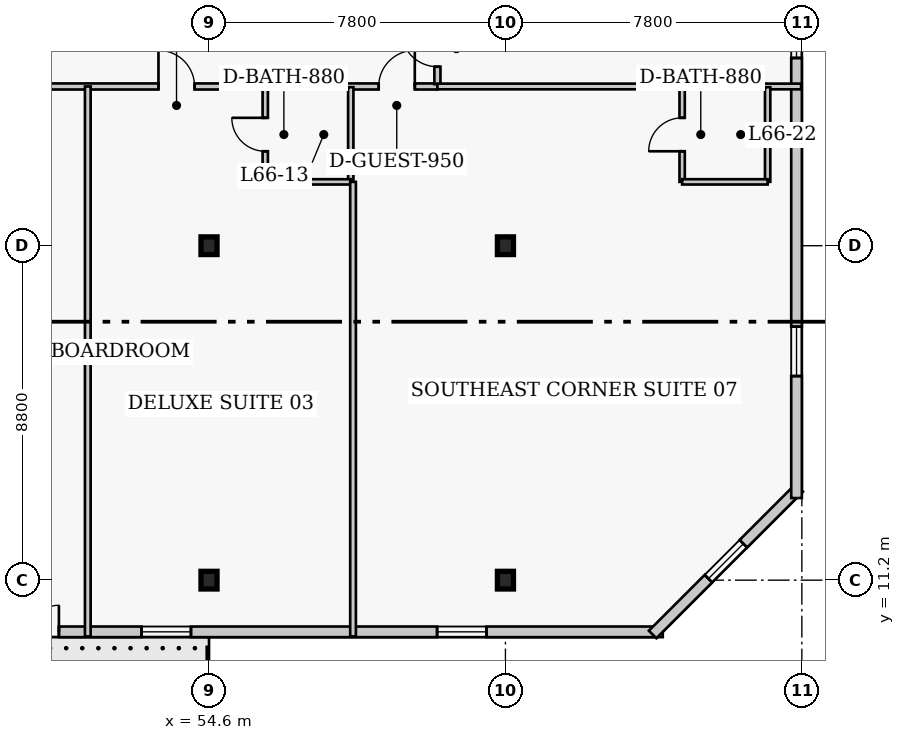
"""IFC4 building model, lengths in metres.
Left out: names, types, materials, properties, quantities, classifications, styles, units other than length and angle.
Written with IfcOpenShell. Run it as: python <this file> out.ifc"""

import sys

from ifc_helpers import new_model, si_unit, direction, frame, frame_2d, origin, origin_2d, place, context, subcontext, project, spatial, rectangle, i_section, extrude, element, fill, save


model = new_model("IFC4")
c1 = context("Model", 3, precision=1e-05, world=origin(), true_north=direction((0.0, 1.0)))
c2 = subcontext(c1, "Body", "Model", "MODEL_VIEW")
j1 = project(units=[si_unit("LENGTHUNIT", "METRE"), si_unit("PLANEANGLEUNIT", "RADIAN")], contexts=[c1])
p1 = place(None, origin())
s1 = spatial("IfcSite", under=j1, at=p1, CompositionType="ELEMENT")
p2 = place(p1, origin())
s2 = spatial("IfcBuilding", under=s1, at=p2, CompositionType="ELEMENT")
p3 = place(p2, frame((0.0, 0.0, 265.4)))
s3 = spatial("IfcBuildingStorey", under=s2, at=p3, CompositionType="ELEMENT", Elevation=265.4)
for number, where, z_axis, x_axis in (
    (1, (54.6, 11.2, 0.0), (0.0, 0.0, 1.0), (1.0, 0.0, 0.0)),
    (2, (54.6, 20.0, 0.0), (0.0, 0.0, 1.0), (1.0, 0.0, 0.0)),
    (3, (62.4, 11.2, 0.0), (0.0, 0.0, 1.0), (1.0, 0.0, 0.0)),
    (4, (62.4, 20.0, 0.0), (0.0, 0.0, 1.0), (1.0, 0.0, 0.0)),
):
    element("IfcColumn", number, at=place(p3, frame(where, z_axis=z_axis, x_axis=x_axis)), inside=s3, PredefinedType="COLUMN", context=c2, shape_type="SweptSolid", body=[
        extrude(i_section(OverallWidth=0.422, OverallDepth=0.465, WebThickness=0.045, FlangeThickness=0.073, FilletRadius=0.017, at=origin_2d()), origin(), (0.0, 0.0, 1.0), 4.0),
    ])
p4 = place(p3, frame((41.71, 9.84, 0.0), z_axis=(0.0, 0.0, 1.0), x_axis=(1.0, 0.0, 0.0)))
e5 = element("IfcWall", 5, at=p4, inside=s3, PredefinedType="SOLIDWALL", context=c2, shape_type="SweptSolid", body=[
    extrude(rectangle(XDim=24.83, YDim=0.28, at=frame_2d((12.415, 0.0))), origin(), (0.0, 0.0, 1.0), 3.76),
])
p5 = place(p4, frame((7.54, 0.0, 0.0)))
e6 = element("IfcOpeningElement", 6, at=p5, cuts=e5, PredefinedType="OPENING", context=c2, shape_type="SweptSolid", body=[
    extrude(rectangle(XDim=1.4, YDim=2.15, at=frame_2d((0.7, 1.075))), frame((0.0, 0.15, 0.0), z_axis=(0.0, -1.0, 0.0), x_axis=(1.0, 0.0, 0.0)), (0.0, 0.0, 1.0), 0.3),
])
p6 = place(p4, frame((2.838, 0.0, 0.85)))
e7 = element("IfcOpeningElement", 7, at=p6, cuts=e5, PredefinedType="OPENING", context=c2, shape_type="SweptSolid", body=[
    extrude(rectangle(XDim=1.3, YDim=1.7, at=frame_2d((0.65, 0.85))), frame((0.0, 0.15, 0.0), z_axis=(0.0, -1.0, 0.0), x_axis=(1.0, 0.0, 0.0)), (0.0, 0.0, 1.0), 0.3),
])
p7 = place(p4, frame((11.115, 0.0, 0.85)))
e8 = element("IfcOpeningElement", 8, at=p7, cuts=e5, PredefinedType="OPENING", context=c2, shape_type="SweptSolid", body=[
    extrude(rectangle(XDim=1.3, YDim=1.7, at=frame_2d((0.65, 0.85))), frame((0.0, 0.15, 0.0), z_axis=(0.0, -1.0, 0.0), x_axis=(1.0, 0.0, 0.0)), (0.0, 0.0, 1.0), 0.3),
])
p8 = place(p4, frame((18.892, 0.0, 0.85)))
e9 = element("IfcOpeningElement", 9, at=p8, cuts=e5, PredefinedType="OPENING", context=c2, shape_type="SweptSolid", body=[
    extrude(rectangle(XDim=1.3, YDim=1.7, at=frame_2d((0.65, 0.85))), frame((0.0, 0.15, 0.0), z_axis=(0.0, -1.0, 0.0), x_axis=(1.0, 0.0, 0.0)), (0.0, 0.0, 1.0), 0.3),
])
p9 = place(p3, frame((66.273, 9.771, 0.0), z_axis=(0.0, 0.0, 1.0), x_axis=(0.707129162587, 0.707084399077, 0.0)))
e10 = element("IfcWall", 10, at=p9, inside=s3, PredefinedType="SOLIDWALL", context=c2, shape_type="SweptSolid", body=[
    extrude(rectangle(XDim=5.454, YDim=0.28, at=frame_2d((2.727, 0.0))), origin(), (0.0, 0.0, 1.0), 3.76),
])
p10 = place(p9, frame((2.077, 0.0, 0.85)))
e11 = element("IfcOpeningElement", 11, at=p10, cuts=e10, PredefinedType="OPENING", context=c2, shape_type="SweptSolid", body=[
    extrude(rectangle(XDim=1.3, YDim=1.7, at=frame_2d((0.65, 0.85))), frame((0.0, 0.15, 0.0), z_axis=(0.0, -1.0, 0.0), x_axis=(1.0, 0.0, 0.0)), (0.0, 0.0, 1.0), 0.3),
])
p11 = place(p3, frame((70.06, 13.36, 0.0), z_axis=(0.0, 0.0, 1.0), x_axis=(0.0, 1.0, 0.0)))
e12 = element("IfcWall", 12, at=p11, inside=s3, PredefinedType="SOLIDWALL", context=c2, shape_type="SweptSolid", body=[
    extrude(rectangle(XDim=30.88, YDim=0.28, at=frame_2d((15.44, 0.0))), origin(), (0.0, 0.0, 1.0), 3.76),
])
p12 = place(p11, frame((3.21, 0.0, 0.85)))
e13 = element("IfcOpeningElement", 13, at=p12, cuts=e12, PredefinedType="OPENING", context=c2, shape_type="SweptSolid", body=[
    extrude(rectangle(XDim=1.3, YDim=1.7, at=frame_2d((0.65, 0.85))), frame((0.0, 0.15, 0.0), z_axis=(0.0, -1.0, 0.0), x_axis=(1.0, 0.0, 0.0)), (0.0, 0.0, 1.0), 0.3),
])
p13 = place(p11, frame((11.58, 0.0, 0.85)))
e14 = element("IfcOpeningElement", 14, at=p13, cuts=e12, PredefinedType="OPENING", context=c2, shape_type="SweptSolid", body=[
    extrude(rectangle(XDim=1.3, YDim=1.7, at=frame_2d((0.65, 0.85))), frame((0.0, 0.15, 0.0), z_axis=(0.0, -1.0, 0.0), x_axis=(1.0, 0.0, 0.0)), (0.0, 0.0, 1.0), 0.3),
])
p14 = place(p11, frame((18.65, 0.0, 0.85)))
e15 = element("IfcOpeningElement", 15, at=p14, cuts=e12, PredefinedType="OPENING", context=c2, shape_type="SweptSolid", body=[
    extrude(rectangle(XDim=1.3, YDim=1.7, at=frame_2d((0.65, 0.85))), frame((0.0, 0.15, 0.0), z_axis=(0.0, -1.0, 0.0), x_axis=(1.0, 0.0, 0.0)), (0.0, 0.0, 1.0), 0.3),
])
p15 = place(p11, frame((26.37, 0.0, 0.85)))
e16 = element("IfcOpeningElement", 16, at=p15, cuts=e12, PredefinedType="OPENING", context=c2, shape_type="SweptSolid", body=[
    extrude(rectangle(XDim=1.3, YDim=1.7, at=frame_2d((0.65, 0.85))), frame((0.0, 0.15, 0.0), z_axis=(0.0, -1.0, 0.0), x_axis=(1.0, 0.0, 0.0)), (0.0, 0.0, 1.0), 0.3),
])
p16 = place(p3, frame((35.8, 24.19, 0.0), z_axis=(0.0, 0.0, 1.0), x_axis=(1.0, 0.0, 0.0)))
e17 = element("IfcWall", 17, at=p16, inside=s3, PredefinedType="PARTITIONING", context=c2, shape_type="SweptSolid", body=[
    extrude(rectangle(XDim=24.81, YDim=0.16, at=frame_2d((12.405, 0.0))), origin(), (0.0, 0.0, 1.0), 3.76),
])
p17 = place(p16, frame((2.115, 0.0, 0.0)))
e18 = element("IfcOpeningElement", 18, at=p17, cuts=e17, PredefinedType="OPENING", context=c2, shape_type="SweptSolid", body=[
    extrude(rectangle(XDim=0.95, YDim=2.1, at=frame_2d((0.475, 1.05))), frame((0.0, 0.09, 0.0), z_axis=(0.0, -1.0, 0.0), x_axis=(1.0, 0.0, 0.0)), (0.0, 0.0, 1.0), 0.18),
])
p18 = place(p16, frame((11.345, 0.0, 0.0)))
e19 = element("IfcOpeningElement", 19, at=p18, cuts=e17, PredefinedType="OPENING", context=c2, shape_type="SweptSolid", body=[
    extrude(rectangle(XDim=1.0, YDim=2.15, at=frame_2d((0.5, 1.075))), frame((0.0, 0.09, 0.0), z_axis=(0.0, -1.0, 0.0), x_axis=(1.0, 0.0, 0.0)), (0.0, 0.0, 1.0), 0.18),
])
p19 = place(p16, frame((17.47, 0.0, 0.0)))
e20 = element("IfcOpeningElement", 20, at=p19, cuts=e17, PredefinedType="OPENING", context=c2, shape_type="SweptSolid", body=[
    extrude(rectangle(XDim=0.95, YDim=2.1, at=frame_2d((0.475, 1.05))), frame((0.0, 0.09, 0.0), z_axis=(0.0, -1.0, 0.0), x_axis=(1.0, 0.0, 0.0)), (0.0, 0.0, 1.0), 0.18),
])
p20 = place(p16, frame((23.265, 0.0, 0.0)))
e21 = element("IfcOpeningElement", 21, at=p20, cuts=e17, PredefinedType="OPENING", context=c2, shape_type="SweptSolid", body=[
    extrude(rectangle(XDim=0.95, YDim=2.1, at=frame_2d((0.475, 1.05))), frame((0.0, 0.09, 0.0), z_axis=(0.0, -1.0, 0.0), x_axis=(1.0, 0.0, 0.0)), (0.0, 0.0, 1.0), 0.18),
])
p21 = place(p3, frame((60.61, 24.25, 0.0), z_axis=(0.0, 0.0, 1.0), x_axis=(0.0, 1.0, 0.0)))
e22 = element("IfcWall", 22, at=p21, inside=s3, PredefinedType="PARTITIONING", context=c2, shape_type="SweptSolid", body=[
    extrude(rectangle(XDim=16.4, YDim=0.16, at=frame_2d((8.2, 0.0))), origin(), (0.0, 0.0, 1.0), 3.76),
])
p22 = place(p21, frame((0.46, 0.0, 0.0)))
e23 = element("IfcOpeningElement", 23, at=p22, cuts=e22, PredefinedType="OPENING", context=c2, shape_type="SweptSolid", body=[
    extrude(rectangle(XDim=0.95, YDim=2.1, at=frame_2d((0.475, 1.05))), frame((0.0, 0.09, 0.0), z_axis=(0.0, -1.0, 0.0), x_axis=(1.0, 0.0, 0.0)), (0.0, 0.0, 1.0), 0.18),
])
p23 = place(p21, frame((11.9, 0.0, 0.0)))
e24 = element("IfcOpeningElement", 24, at=p23, cuts=e22, PredefinedType="OPENING", context=c2, shape_type="SweptSolid", body=[
    extrude(rectangle(XDim=1.0, YDim=2.15, at=frame_2d((0.5, 1.075))), frame((0.0, 0.09, 0.0), z_axis=(0.0, -1.0, 0.0), x_axis=(1.0, 0.0, 0.0)), (0.0, 0.0, 1.0), 0.18),
])
p24 = place(p3, frame((51.41, 9.72, 0.0), z_axis=(0.0, 0.0, 1.0), x_axis=(0.0, 1.0, 0.0)))
e25 = element("IfcWall", 25, at=p24, inside=s3, PredefinedType="PARTITIONING", context=c2, shape_type="SweptSolid", body=[
    extrude(rectangle(XDim=14.47, YDim=0.15, at=frame_2d((7.235, 0.0))), origin(), (0.0, 0.0, 1.0), 3.76),
])
p25 = place(p3, frame((56.08, 21.68, 0.0), z_axis=(0.0, 0.0, 1.0), x_axis=(0.0, 1.0, 0.0)))
e26 = element("IfcWall", 26, at=p25, inside=s3, PredefinedType="PLUMBINGWALL", context=c2, shape_type="SweptSolid", body=[
    extrude(rectangle(XDim=2.49, YDim=0.14, at=frame_2d((1.245, 0.0))), origin(), (0.0, 0.0, 1.0), 3.76),
])
p26 = place(p25, frame((0.805, 0.0, 0.0)))
e27 = element("IfcOpeningElement", 27, at=p26, cuts=e26, PredefinedType="OPENING", context=c2, shape_type="SweptSolid", body=[
    extrude(rectangle(XDim=0.88, YDim=2.05, at=frame_2d((0.44, 1.025))), frame((0.0, 0.08, 0.0), z_axis=(0.0, -1.0, 0.0), x_axis=(1.0, 0.0, 0.0)), (0.0, 0.0, 1.0), 0.16),
])
p27 = place(p3, frame((58.33, 21.68, 0.0), z_axis=(0.0, 0.0, 1.0), x_axis=(0.0, 1.0, 0.0)))
e28 = element("IfcWall", 28, at=p27, inside=s3, PredefinedType="PLUMBINGWALL", context=c2, shape_type="SweptSolid", body=[
    extrude(rectangle(XDim=2.49, YDim=0.14, at=frame_2d((1.245, 0.0))), origin(), (0.0, 0.0, 1.0), 3.76),
])
p28 = place(p3, frame((56.08, 21.68, 0.0), z_axis=(0.0, 0.0, 1.0), x_axis=(1.0, 0.0, 0.0)))
e29 = element("IfcWall", 29, at=p28, inside=s3, PredefinedType="PLUMBINGWALL", context=c2, shape_type="SweptSolid", body=[
    extrude(rectangle(XDim=2.25, YDim=0.14, at=frame_2d((1.125, 0.0))), origin(), (0.0, 0.0, 1.0), 3.76),
])
p29 = place(p3, frame((58.39, 9.72, 0.0), z_axis=(0.0, 0.0, 1.0), x_axis=(0.0, 1.0, 0.0)))
e30 = element("IfcWall", 30, at=p29, inside=s3, PredefinedType="PARTITIONING", context=c2, shape_type="SweptSolid", body=[
    extrude(rectangle(XDim=11.96, YDim=0.15, at=frame_2d((5.98, 0.0))), origin(), (0.0, 0.0, 1.0), 3.356),
])
p30 = place(p3, frame((60.61, 24.19, 0.0), z_axis=(0.0, 0.0, 1.0), x_axis=(1.0, 0.0, 0.0)))
e31 = element("IfcWall", 31, at=p30, inside=s3, PredefinedType="PARTITIONING", context=c2, shape_type="SweptSolid", body=[
    extrude(rectangle(XDim=9.57, YDim=0.15, at=frame_2d((4.785, 0.0))), origin(), (0.0, 0.0, 1.0), 3.76),
])
p31 = place(p3, frame((67.05, 21.68, 0.0), z_axis=(0.0, 0.0, 1.0), x_axis=(0.0, 1.0, 0.0)))
e32 = element("IfcWall", 32, at=p31, inside=s3, PredefinedType="PLUMBINGWALL", context=c2, shape_type="SweptSolid", body=[
    extrude(rectangle(XDim=2.49, YDim=0.14, at=frame_2d((1.245, 0.0))), origin(), (0.0, 0.0, 1.0), 3.76),
])
p32 = place(p31, frame((0.805, 0.0, 0.0)))
e33 = element("IfcOpeningElement", 33, at=p32, cuts=e32, PredefinedType="OPENING", context=c2, shape_type="SweptSolid", body=[
    extrude(rectangle(XDim=0.88, YDim=2.05, at=frame_2d((0.44, 1.025))), frame((0.0, 0.08, 0.0), z_axis=(0.0, -1.0, 0.0), x_axis=(1.0, 0.0, 0.0)), (0.0, 0.0, 1.0), 0.16),
])
p33 = place(p3, frame((69.3, 21.68, 0.0), z_axis=(0.0, 0.0, 1.0), x_axis=(0.0, 1.0, 0.0)))
e34 = element("IfcWall", 34, at=p33, inside=s3, PredefinedType="PLUMBINGWALL", context=c2, shape_type="SweptSolid", body=[
    extrude(rectangle(XDim=2.49, YDim=0.14, at=frame_2d((1.245, 0.0))), origin(), (0.0, 0.0, 1.0), 3.76),
])
p34 = place(p3, frame((67.05, 21.68, 0.0), z_axis=(0.0, 0.0, 1.0), x_axis=(1.0, 0.0, 0.0)))
e35 = element("IfcWall", 35, at=p34, inside=s3, PredefinedType="PLUMBINGWALL", context=c2, shape_type="SweptSolid", body=[
    extrude(rectangle(XDim=2.25, YDim=0.14, at=frame_2d((1.125, 0.0))), origin(), (0.0, 0.0, 1.0), 3.76),
])
p35 = place(p5, origin())
e36 = element("IfcDoor", 36, at=p35, inside=s3, OperationType="DOUBLE_DOOR_SINGLE_SWING", PredefinedType="DOOR", context=c2, shape_type="SweptSolid", body=[
    extrude(rectangle(XDim=1.4, YDim=2.15, at=frame_2d((0.7, 1.075))), frame((0.0, 0.025, 0.0), z_axis=(0.0, -1.0, 0.0), x_axis=(1.0, 0.0, 0.0)), (0.0, 0.0, 1.0), 0.05),
])
fill(e6, e36)
p36 = place(p7, origin())
e37 = element("IfcWindow", 37, at=p36, inside=s3, PartitioningType="SINGLE_PANEL", PredefinedType="WINDOW", context=c2, shape_type="SweptSolid", body=[
    extrude(rectangle(XDim=1.3, YDim=1.7, at=frame_2d((0.65, 0.85))), frame((0.0, 0.03, 0.0), z_axis=(0.0, -1.0, 0.0), x_axis=(1.0, 0.0, 0.0)), (0.0, 0.0, 1.0), 0.06),
])
fill(e8, e37)
p37 = place(p8, origin())
e38 = element("IfcWindow", 38, at=p37, inside=s3, PartitioningType="SINGLE_PANEL", PredefinedType="WINDOW", context=c2, shape_type="SweptSolid", body=[
    extrude(rectangle(XDim=1.3, YDim=1.7, at=frame_2d((0.65, 0.85))), frame((0.0, 0.03, 0.0), z_axis=(0.0, -1.0, 0.0), x_axis=(1.0, 0.0, 0.0)), (0.0, 0.0, 1.0), 0.06),
])
fill(e9, e38)
p38 = place(p10, origin())
e39 = element("IfcWindow", 39, at=p38, inside=s3, PartitioningType="SINGLE_PANEL", PredefinedType="WINDOW", context=c2, shape_type="SweptSolid", body=[
    extrude(rectangle(XDim=1.3, YDim=1.7, at=frame_2d((0.65, 0.85))), frame((0.0, 0.03, 0.0), z_axis=(0.0, -1.0, 0.0), x_axis=(1.0, 0.0, 0.0)), (0.0, 0.0, 1.0), 0.06),
])
fill(e11, e39)
p39 = place(p12, origin())
e40 = element("IfcWindow", 40, at=p39, inside=s3, PartitioningType="SINGLE_PANEL", PredefinedType="WINDOW", context=c2, shape_type="SweptSolid", body=[
    extrude(rectangle(XDim=1.3, YDim=1.7, at=frame_2d((0.65, 0.85))), frame((0.0, 0.03, 0.0), z_axis=(0.0, -1.0, 0.0), x_axis=(1.0, 0.0, 0.0)), (0.0, 0.0, 1.0), 0.06),
])
fill(e13, e40)
p40 = place(p13, origin())
e41 = element("IfcWindow", 41, at=p40, inside=s3, PartitioningType="SINGLE_PANEL", PredefinedType="WINDOW", context=c2, shape_type="SweptSolid", body=[
    extrude(rectangle(XDim=1.3, YDim=1.7, at=frame_2d((0.65, 0.85))), frame((0.0, 0.03, 0.0), z_axis=(0.0, -1.0, 0.0), x_axis=(1.0, 0.0, 0.0)), (0.0, 0.0, 1.0), 0.06),
])
fill(e14, e41)
p41 = place(p26, origin())
e42 = element("IfcDoor", 42, at=p41, inside=s3, OperationType="SINGLE_SWING_RIGHT", PredefinedType="DOOR", context=c2, shape_type="SweptSolid", body=[
    extrude(rectangle(XDim=0.88, YDim=2.05, at=frame_2d((0.44, 1.025))), frame((0.0, 0.025, 0.0), z_axis=(0.0, -1.0, 0.0), x_axis=(1.0, 0.0, 0.0)), (0.0, 0.0, 1.0), 0.05),
])
fill(e27, e42)
p42 = place(p19, origin())
e43 = element("IfcDoor", 43, at=p42, inside=s3, OperationType="SINGLE_SWING_LEFT", PredefinedType="DOOR", context=c2, shape_type="SweptSolid", body=[
    extrude(rectangle(XDim=0.95, YDim=2.1, at=frame_2d((0.475, 1.05))), frame((0.0, 0.025, 0.0), z_axis=(0.0, -1.0, 0.0), x_axis=(1.0, 0.0, 0.0)), (0.0, 0.0, 1.0), 0.05),
])
fill(e20, e43)
p43 = place(p32, origin())
e44 = element("IfcDoor", 44, at=p43, inside=s3, OperationType="SINGLE_SWING_LEFT", PredefinedType="DOOR", context=c2, shape_type="SweptSolid", body=[
    extrude(rectangle(XDim=0.88, YDim=2.05, at=frame_2d((0.44, 1.025))), frame((0.0, 0.025, 0.0), z_axis=(0.0, -1.0, 0.0), x_axis=(1.0, 0.0, 0.0)), (0.0, 0.0, 1.0), 0.05),
])
fill(e33, e44)
p44 = place(p20, origin())
e45 = element("IfcDoor", 45, at=p44, inside=s3, OperationType="SINGLE_SWING_RIGHT", PredefinedType="DOOR", context=c2, shape_type="SweptSolid", body=[
    extrude(rectangle(XDim=0.95, YDim=2.1, at=frame_2d((0.475, 1.05))), frame((0.0, 0.025, 0.0), z_axis=(0.0, -1.0, 0.0), x_axis=(1.0, 0.0, 0.0)), (0.0, 0.0, 1.0), 0.05),
])
fill(e21, e45)
p45 = place(p22, origin())
e46 = element("IfcDoor", 46, at=p45, inside=s3, OperationType="SINGLE_SWING_RIGHT", PredefinedType="DOOR", context=c2, shape_type="SweptSolid", body=[
    extrude(rectangle(XDim=0.95, YDim=2.1, at=frame_2d((0.475, 1.05))), frame((0.0, 0.025, 0.0), z_axis=(0.0, -1.0, 0.0), x_axis=(1.0, 0.0, 0.0)), (0.0, 0.0, 1.0), 0.05),
])
fill(e23, e46)
save(model, sys.argv[1])
